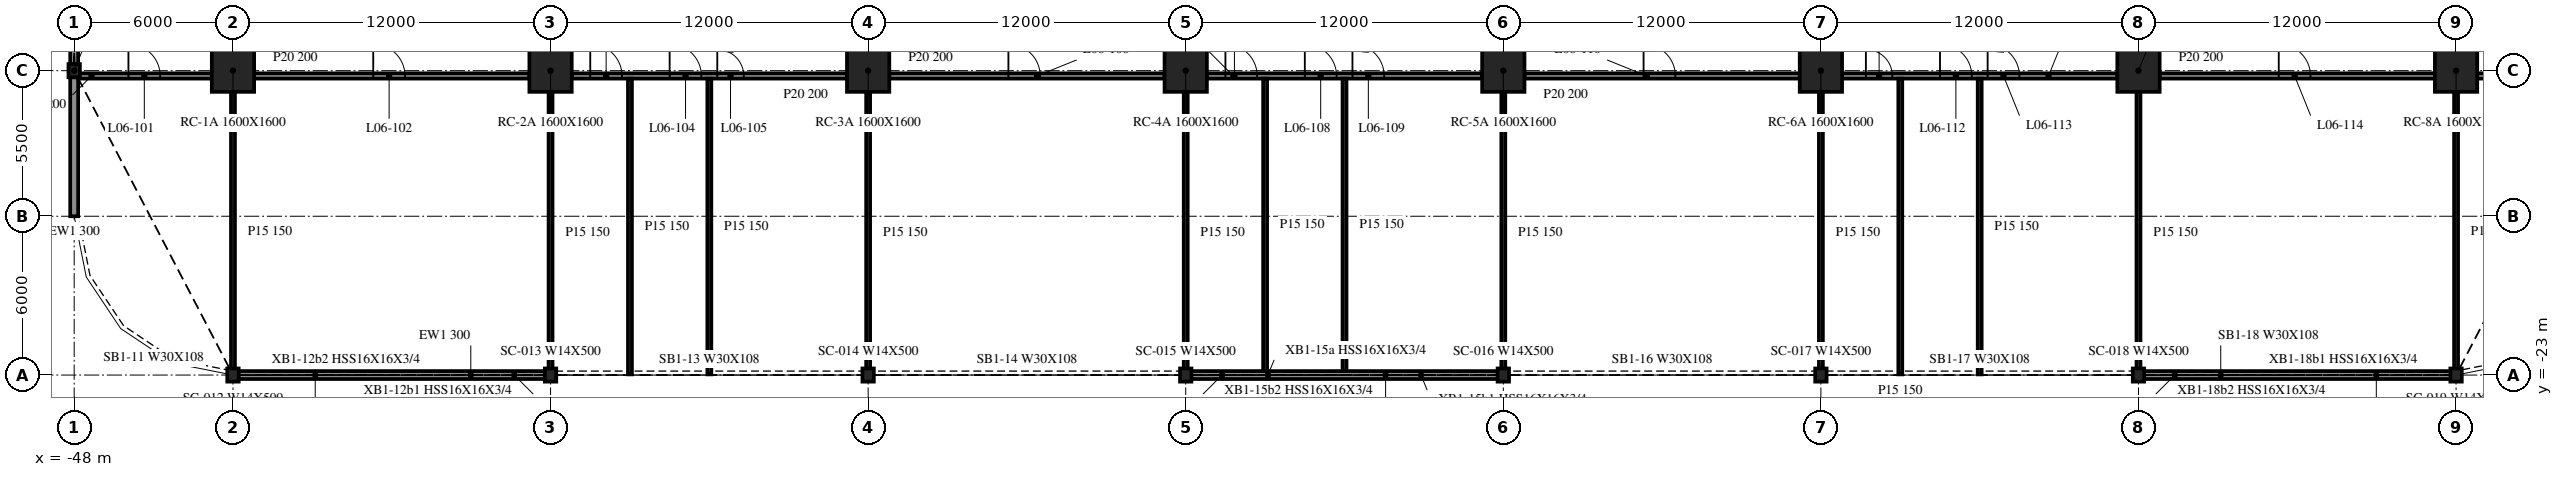
"""IFC4 building model, lengths in metres.
Left out: names, types, materials, properties, quantities, classifications, styles, units other than length and angle.
Written with IfcOpenShell. Run it as: python <this file> out.ifc"""

import sys

from ifc_helpers import new_model, si_unit, direction, frame, frame_2d, origin, origin_2d, place, context, subcontext, project, spatial, rectangle, i_section, extrude, element, fill, save


model = new_model("IFC4")
c1 = context("Model", 3, precision=1e-05, world=origin(), true_north=direction((0.0, 1.0)))
c2 = subcontext(c1, "Body", "Model", "MODEL_VIEW")
j1 = project(units=[si_unit("LENGTHUNIT", "METRE"), si_unit("PLANEANGLEUNIT", "RADIAN")], contexts=[c1])
p1 = place(None, origin())
s1 = spatial("IfcSite", under=j1, at=p1, CompositionType="ELEMENT")
p2 = place(p1, origin())
s2 = spatial("IfcBuilding", under=s1, at=p2, CompositionType="ELEMENT")
p3 = place(p2, frame((0.0, 0.0, 28.7)))
s3 = spatial("IfcBuildingStorey", under=s2, at=p3, CompositionType="ELEMENT", Elevation=28.7)
for number, where, z_axis, x_axis in (
    (1, (-42.0, -11.5, -0.34), (0.0, 0.0, 1.0), (1.0, 0.0, 0.0)),
    (2, (-30.0, -11.5, -0.34), (0.0, 0.0, 1.0), (1.0, 0.0, 0.0)),
    (3, (-18.0, -11.5, -0.34), (0.0, 0.0, 1.0), (1.0, 0.0, 0.0)),
    (4, (-6.0, -11.5, -0.34), (0.0, 0.0, 1.0), (1.0, 0.0, 0.0)),
    (5, (6.0, -11.5, -0.34), (0.0, 0.0, 1.0), (1.0, 0.0, 0.0)),
    (6, (18.0, -11.5, -0.34), (0.0, 0.0, 1.0), (1.0, 0.0, 0.0)),
    (7, (30.0, -11.5, -0.34), (0.0, 0.0, 1.0), (1.0, 0.0, 0.0)),
    (8, (42.0, -11.5, -0.34), (0.0, 0.0, 1.0), (1.0, 0.0, 0.0)),
):
    element("IfcColumn", number, at=place(p3, frame(where, z_axis=z_axis, x_axis=x_axis)), inside=s3, PredefinedType="COLUMN", context=c2, shape_type="SweptSolid", body=[
        extrude(rectangle(XDim=1.6, YDim=1.6, at=origin_2d()), origin(), (0.0, 0.0, 1.0), 4.3),
    ])
for number, where, z_axis, x_axis in (
    (9, (-48.0, -11.5, -0.34), (0.0, 0.0, 1.0), (1.0, 0.0, 0.0)),
    (10, (-42.0, -23.0, -0.34), (0.0, 0.0, 1.0), (1.0, 0.0, 0.0)),
    (11, (-30.0, -23.0, -0.34), (0.0, 0.0, 1.0), (1.0, 0.0, 0.0)),
    (12, (-18.0, -23.0, -0.34), (0.0, 0.0, 1.0), (1.0, 0.0, 0.0)),
    (13, (-6.0, -23.0, -0.34), (0.0, 0.0, 1.0), (1.0, 0.0, 0.0)),
    (14, (6.0, -23.0, -0.34), (0.0, 0.0, 1.0), (1.0, 0.0, 0.0)),
    (15, (18.0, -23.0, -0.34), (0.0, 0.0, 1.0), (1.0, 0.0, 0.0)),
    (16, (30.0, -23.0, -0.34), (0.0, 0.0, 1.0), (1.0, 0.0, 0.0)),
    (17, (42.0, -23.0, -0.34), (0.0, 0.0, 1.0), (1.0, 0.0, 0.0)),
):
    element("IfcColumn", number, at=place(p3, frame(where, z_axis=z_axis, x_axis=x_axis)), inside=s3, PredefinedType="COLUMN", context=c2, shape_type="SweptSolid", body=[
        extrude(i_section(OverallWidth=0.432, OverallDepth=0.498, WebThickness=0.056, FlangeThickness=0.089, at=origin_2d()), origin(), (0.0, 0.0, 1.0), 4.3),
    ])
p4 = place(p3, frame((-48.0, -0.249, 0.0), z_axis=(0.0, 0.0, 1.0), x_axis=(0.0, -1.0, 0.0)))
e18 = element("IfcWall", 18, at=p4, inside=s3, PredefinedType="NOTDEFINED", context=c2, shape_type="SweptSolid", body=[
    extrude(rectangle(XDim=11.002, YDim=0.3, at=frame_2d((5.501, 0.0))), origin(), (0.0, 0.0, 1.0), 3.203),
])
p5 = place(p3, frame((-48.0, -11.749, 0.0), z_axis=(0.0, 0.0, 1.0), x_axis=(0.0, -1.0, 0.0)))
e19 = element("IfcWall", 19, at=p5, inside=s3, PredefinedType="NOTDEFINED", context=c2, shape_type="SweptSolid", body=[
    extrude(rectangle(XDim=5.251, YDim=0.3, at=frame_2d((2.625, 0.0))), origin(), (0.0, 0.0, 1.0), 3.203),
])
for number, where, z_axis, x_axis in (
    (20, (-41.972, -23.0, 0.0), (0.0, 0.0, 1.0), (1.0, 0.0, 0.0)),
    (21, (-5.972, -23.0, 0.0), (0.0, 0.0, 1.0), (1.0, 0.0, 0.0)),
    (22, (30.028, -23.0, 0.0), (0.0, 0.0, 1.0), (1.0, 0.0, 0.0)),
):
    element("IfcWall", number, at=place(p3, frame(where, z_axis=z_axis, x_axis=x_axis)), inside=s3, PredefinedType="NOTDEFINED", context=c2, shape_type="SweptSolid", body=[
        extrude(rectangle(XDim=11.944, YDim=0.3, at=frame_2d((5.972, 0.0))), origin(), (0.0, 0.0, 1.0), 3.203),
    ])
p6 = place(p3, frame((-47.85, -11.7, 0.0), z_axis=(0.0, 0.0, 1.0), x_axis=(1.0, 0.0, 0.0)))
e23 = element("IfcWall", 23, at=p6, inside=s3, PredefinedType="PARTITIONING", context=c2, shape_type="SweptSolid", body=[
    extrude(rectangle(XDim=5.05, YDim=0.2, at=frame_2d((2.525, 0.0))), origin(), (0.0, 0.0, 1.0), 3.96),
])
p7 = place(p6, frame((1.9, 0.0, 0.0)))
e24 = element("IfcOpeningElement", 24, at=p7, cuts=e23, PredefinedType="OPENING", context=c2, shape_type="SweptSolid", body=[
    extrude(rectangle(XDim=1.2, YDim=2.1, at=frame_2d((0.6, 1.05))), frame((0.0, 0.11, 0.0), z_axis=(0.0, -1.0, 0.0), x_axis=(1.0, 0.0, 0.0)), (0.0, 0.0, 1.0), 0.22),
])
p8 = place(p3, frame((-41.2, -11.7, 0.0), z_axis=(0.0, 0.0, 1.0), x_axis=(1.0, 0.0, 0.0)))
e25 = element("IfcWall", 25, at=p8, inside=s3, PredefinedType="PARTITIONING", context=c2, shape_type="SweptSolid", body=[
    extrude(rectangle(XDim=10.4, YDim=0.2, at=frame_2d((5.2, 0.0))), origin(), (0.0, 0.0, 1.0), 3.96),
])
p9 = place(p8, frame((4.5, 0.0, 0.0)))
e26 = element("IfcOpeningElement", 26, at=p9, cuts=e25, PredefinedType="OPENING", context=c2, shape_type="SweptSolid", body=[
    extrude(rectangle(XDim=1.2, YDim=2.1, at=frame_2d((0.6, 1.05))), frame((0.0, 0.11, 0.0), z_axis=(0.0, -1.0, 0.0), x_axis=(1.0, 0.0, 0.0)), (0.0, 0.0, 1.0), 0.22),
])
p10 = place(p3, frame((-29.2, -11.7, 0.0), z_axis=(0.0, 0.0, 1.0), x_axis=(1.0, 0.0, 0.0)))
e27 = element("IfcWall", 27, at=p10, inside=s3, PredefinedType="PARTITIONING", context=c2, shape_type="SweptSolid", body=[
    extrude(rectangle(XDim=10.4, YDim=0.2, at=frame_2d((5.2, 0.0))), origin(), (0.0, 0.0, 1.0), 3.96),
])
p11 = place(p10, frame((0.7, 0.0, 0.0)))
e28 = element("IfcOpeningElement", 28, at=p11, cuts=e27, PredefinedType="OPENING", context=c2, shape_type="SweptSolid", body=[
    extrude(rectangle(XDim=1.2, YDim=2.1, at=frame_2d((0.6, 1.05))), frame((0.0, 0.11, 0.0), z_axis=(0.0, -1.0, 0.0), x_axis=(1.0, 0.0, 0.0)), (0.0, 0.0, 1.0), 0.22),
])
p12 = place(p10, frame((3.7, 0.0, 0.0)))
e29 = element("IfcOpeningElement", 29, at=p12, cuts=e27, PredefinedType="OPENING", context=c2, shape_type="SweptSolid", body=[
    extrude(rectangle(XDim=1.2, YDim=2.1, at=frame_2d((0.6, 1.05))), frame((0.0, 0.11, 0.0), z_axis=(0.0, -1.0, 0.0), x_axis=(1.0, 0.0, 0.0)), (0.0, 0.0, 1.0), 0.22),
])
p13 = place(p10, frame((5.5, 0.0, 0.0)))
e30 = element("IfcOpeningElement", 30, at=p13, cuts=e27, PredefinedType="OPENING", context=c2, shape_type="SweptSolid", body=[
    extrude(rectangle(XDim=1.0, YDim=2.1, at=frame_2d((0.5, 1.05))), frame((0.0, 0.11, 0.0), z_axis=(0.0, -1.0, 0.0), x_axis=(1.0, 0.0, 0.0)), (0.0, 0.0, 1.0), 0.22),
])
p14 = place(p3, frame((-17.2, -11.7, 0.0), z_axis=(0.0, 0.0, 1.0), x_axis=(1.0, 0.0, 0.0)))
e31 = element("IfcWall", 31, at=p14, inside=s3, PredefinedType="PARTITIONING", context=c2, shape_type="SweptSolid", body=[
    extrude(rectangle(XDim=10.4, YDim=0.2, at=frame_2d((5.2, 0.0))), origin(), (0.0, 0.0, 1.0), 3.96),
])
p15 = place(p14, frame((4.5, 0.0, 0.0)))
e32 = element("IfcOpeningElement", 32, at=p15, cuts=e31, PredefinedType="OPENING", context=c2, shape_type="SweptSolid", body=[
    extrude(rectangle(XDim=1.2, YDim=2.1, at=frame_2d((0.6, 1.05))), frame((0.0, 0.11, 0.0), z_axis=(0.0, -1.0, 0.0), x_axis=(1.0, 0.0, 0.0)), (0.0, 0.0, 1.0), 0.22),
])
p16 = place(p3, frame((-5.2, -11.7, 0.0), z_axis=(0.0, 0.0, 1.0), x_axis=(1.0, 0.0, 0.0)))
e33 = element("IfcWall", 33, at=p16, inside=s3, PredefinedType="PARTITIONING", context=c2, shape_type="SweptSolid", body=[
    extrude(rectangle(XDim=10.4, YDim=0.2, at=frame_2d((5.2, 0.0))), origin(), (0.0, 0.0, 1.0), 3.96),
])
p17 = place(p16, frame((0.7, 0.0, 0.0)))
e34 = element("IfcOpeningElement", 34, at=p17, cuts=e33, PredefinedType="OPENING", context=c2, shape_type="SweptSolid", body=[
    extrude(rectangle(XDim=1.2, YDim=2.1, at=frame_2d((0.6, 1.05))), frame((0.0, 0.11, 0.0), z_axis=(0.0, -1.0, 0.0), x_axis=(1.0, 0.0, 0.0)), (0.0, 0.0, 1.0), 0.22),
])
p18 = place(p16, frame((3.7, 0.0, 0.0)))
e35 = element("IfcOpeningElement", 35, at=p18, cuts=e33, PredefinedType="OPENING", context=c2, shape_type="SweptSolid", body=[
    extrude(rectangle(XDim=1.2, YDim=2.1, at=frame_2d((0.6, 1.05))), frame((0.0, 0.11, 0.0), z_axis=(0.0, -1.0, 0.0), x_axis=(1.0, 0.0, 0.0)), (0.0, 0.0, 1.0), 0.22),
])
p19 = place(p16, frame((5.5, 0.0, 0.0)))
e36 = element("IfcOpeningElement", 36, at=p19, cuts=e33, PredefinedType="OPENING", context=c2, shape_type="SweptSolid", body=[
    extrude(rectangle(XDim=1.2, YDim=2.1, at=frame_2d((0.6, 1.05))), frame((0.0, 0.11, 0.0), z_axis=(0.0, -1.0, 0.0), x_axis=(1.0, 0.0, 0.0)), (0.0, 0.0, 1.0), 0.22),
])
p20 = place(p3, frame((6.8, -11.7, 0.0), z_axis=(0.0, 0.0, 1.0), x_axis=(1.0, 0.0, 0.0)))
e37 = element("IfcWall", 37, at=p20, inside=s3, PredefinedType="PARTITIONING", context=c2, shape_type="SweptSolid", body=[
    extrude(rectangle(XDim=10.4, YDim=0.2, at=frame_2d((5.2, 0.0))), origin(), (0.0, 0.0, 1.0), 3.96),
])
p21 = place(p20, frame((4.5, 0.0, 0.0)))
e38 = element("IfcOpeningElement", 38, at=p21, cuts=e37, PredefinedType="OPENING", context=c2, shape_type="SweptSolid", body=[
    extrude(rectangle(XDim=1.2, YDim=2.1, at=frame_2d((0.6, 1.05))), frame((0.0, 0.11, 0.0), z_axis=(0.0, -1.0, 0.0), x_axis=(1.0, 0.0, 0.0)), (0.0, 0.0, 1.0), 0.22),
])
p22 = place(p3, frame((18.8, -11.7, 0.0), z_axis=(0.0, 0.0, 1.0), x_axis=(1.0, 0.0, 0.0)))
e39 = element("IfcWall", 39, at=p22, inside=s3, PredefinedType="PARTITIONING", context=c2, shape_type="SweptSolid", body=[
    extrude(rectangle(XDim=10.4, YDim=0.2, at=frame_2d((5.2, 0.0))), origin(), (0.0, 0.0, 1.0), 3.96),
])
p23 = place(p22, frame((0.9, 0.0, 0.0)))
e40 = element("IfcOpeningElement", 40, at=p23, cuts=e39, PredefinedType="OPENING", context=c2, shape_type="SweptSolid", body=[
    extrude(rectangle(XDim=1.0, YDim=2.1, at=frame_2d((0.5, 1.05))), frame((0.0, 0.11, 0.0), z_axis=(0.0, -1.0, 0.0), x_axis=(1.0, 0.0, 0.0)), (0.0, 0.0, 1.0), 0.22),
])
p24 = place(p22, frame((3.7, 0.0, 0.0)))
e41 = element("IfcOpeningElement", 41, at=p24, cuts=e39, PredefinedType="OPENING", context=c2, shape_type="SweptSolid", body=[
    extrude(rectangle(XDim=1.2, YDim=2.1, at=frame_2d((0.6, 1.05))), frame((0.0, 0.11, 0.0), z_axis=(0.0, -1.0, 0.0), x_axis=(1.0, 0.0, 0.0)), (0.0, 0.0, 1.0), 0.22),
])
p25 = place(p22, frame((5.5, 0.0, 0.0)))
e42 = element("IfcOpeningElement", 42, at=p25, cuts=e39, PredefinedType="OPENING", context=c2, shape_type="SweptSolid", body=[
    extrude(rectangle(XDim=1.2, YDim=2.1, at=frame_2d((0.6, 1.05))), frame((0.0, 0.11, 0.0), z_axis=(0.0, -1.0, 0.0), x_axis=(1.0, 0.0, 0.0)), (0.0, 0.0, 1.0), 0.22),
])
p26 = place(p3, frame((30.8, -11.7, 0.0), z_axis=(0.0, 0.0, 1.0), x_axis=(1.0, 0.0, 0.0)))
e43 = element("IfcWall", 43, at=p26, inside=s3, PredefinedType="PARTITIONING", context=c2, shape_type="SweptSolid", body=[
    extrude(rectangle(XDim=10.4, YDim=0.2, at=frame_2d((5.2, 0.0))), origin(), (0.0, 0.0, 1.0), 3.96),
])
p27 = place(p26, frame((4.5, 0.0, 0.0)))
e44 = element("IfcOpeningElement", 44, at=p27, cuts=e43, PredefinedType="OPENING", context=c2, shape_type="SweptSolid", body=[
    extrude(rectangle(XDim=1.2, YDim=2.1, at=frame_2d((0.6, 1.05))), frame((0.0, 0.11, 0.0), z_axis=(0.0, -1.0, 0.0), x_axis=(1.0, 0.0, 0.0)), (0.0, 0.0, 1.0), 0.22),
])
p28 = place(p3, frame((42.8, -11.7, 0.0), z_axis=(0.0, 0.0, 1.0), x_axis=(1.0, 0.0, 0.0)))
e45 = element("IfcWall", 45, at=p28, inside=s3, PredefinedType="PARTITIONING", context=c2, shape_type="SweptSolid", body=[
    extrude(rectangle(XDim=5.05, YDim=0.2, at=frame_2d((2.525, 0.0))), origin(), (0.0, 0.0, 1.0), 3.96),
])
p29 = place(p28, frame((1.9, 0.0, 0.0)))
e46 = element("IfcOpeningElement", 46, at=p29, cuts=e45, PredefinedType="OPENING", context=c2, shape_type="SweptSolid", body=[
    extrude(rectangle(XDim=1.2, YDim=2.1, at=frame_2d((0.6, 1.05))), frame((0.0, 0.11, 0.0), z_axis=(0.0, -1.0, 0.0), x_axis=(1.0, 0.0, 0.0)), (0.0, 0.0, 1.0), 0.22),
])
p30 = place(p3, frame((-42.0, -22.847, 0.0), z_axis=(0.0, 0.0, 1.0), x_axis=(0.0, 1.0, 0.0)))
e47 = element("IfcWall", 47, at=p30, inside=s3, PredefinedType="PARTITIONING", context=c2, shape_type="SweptSolid", body=[
    extrude(rectangle(XDim=10.547, YDim=0.15, at=frame_2d((5.273, 0.0))), origin(), (0.0, 0.0, 1.0), 3.96),
])
p31 = place(p3, frame((-30.0, -22.975, 0.0), z_axis=(0.0, 0.0, 1.0), x_axis=(0.0, 1.0, 0.0)))
e48 = element("IfcWall", 48, at=p31, inside=s3, PredefinedType="PARTITIONING", context=c2, shape_type="SweptSolid", body=[
    extrude(rectangle(XDim=10.675, YDim=0.15, at=frame_2d((5.337, 0.0))), origin(), (0.0, 0.0, 1.0), 3.96),
])
for number, where, z_axis, x_axis in (
    (49, (-27.0, -22.975, 0.0), (0.0, 0.0, 1.0), (0.0, 1.0, 0.0)),
    (50, (-24.0, -22.975, 0.0), (0.0, 0.0, 1.0), (0.0, 1.0, 0.0)),
):
    element("IfcWall", number, at=place(p3, frame(where, z_axis=z_axis, x_axis=x_axis)), inside=s3, PredefinedType="PARTITIONING", context=c2, shape_type="SweptSolid", body=[
        extrude(rectangle(XDim=11.175, YDim=0.15, at=frame_2d((5.587, 0.0))), origin(), (0.0, 0.0, 1.0), 3.96),
    ])
for number, where, z_axis, x_axis in (
    (51, (-18.0, -22.975, 0.0), (0.0, 0.0, 1.0), (0.0, 1.0, 0.0)),
    (52, (-6.0, -22.975, 0.0), (0.0, 0.0, 1.0), (0.0, 1.0, 0.0)),
):
    element("IfcWall", number, at=place(p3, frame(where, z_axis=z_axis, x_axis=x_axis)), inside=s3, PredefinedType="PARTITIONING", context=c2, shape_type="SweptSolid", body=[
        extrude(rectangle(XDim=10.675, YDim=0.15, at=frame_2d((5.337, 0.0))), origin(), (0.0, 0.0, 1.0), 3.96),
    ])
for number, where, z_axis, x_axis in (
    (53, (-3.0, -22.85, 0.0), (0.0, 0.0, 1.0), (0.0, 1.0, 0.0)),
    (54, (0.0, -22.85, 0.0), (0.0, 0.0, 1.0), (0.0, 1.0, 0.0)),
):
    element("IfcWall", number, at=place(p3, frame(where, z_axis=z_axis, x_axis=x_axis)), inside=s3, PredefinedType="PARTITIONING", context=c2, shape_type="SweptSolid", body=[
        extrude(rectangle(XDim=11.05, YDim=0.15, at=frame_2d((5.525, 0.0))), origin(), (0.0, 0.0, 1.0), 3.96),
    ])
for number, where, z_axis, x_axis in (
    (55, (6.0, -22.975, 0.0), (0.0, 0.0, 1.0), (0.0, 1.0, 0.0)),
    (56, (18.0, -22.975, 0.0), (0.0, 0.0, 1.0), (0.0, 1.0, 0.0)),
):
    element("IfcWall", number, at=place(p3, frame(where, z_axis=z_axis, x_axis=x_axis)), inside=s3, PredefinedType="PARTITIONING", context=c2, shape_type="SweptSolid", body=[
        extrude(rectangle(XDim=10.675, YDim=0.15, at=frame_2d((5.337, 0.0))), origin(), (0.0, 0.0, 1.0), 3.96),
    ])
for number, where, z_axis, x_axis in (
    (57, (21.0, -22.975, 0.0), (0.0, 0.0, 1.0), (0.0, 1.0, 0.0)),
    (58, (24.0, -22.975, 0.0), (0.0, 0.0, 1.0), (0.0, 1.0, 0.0)),
):
    element("IfcWall", number, at=place(p3, frame(where, z_axis=z_axis, x_axis=x_axis)), inside=s3, PredefinedType="PARTITIONING", context=c2, shape_type="SweptSolid", body=[
        extrude(rectangle(XDim=11.175, YDim=0.15, at=frame_2d((5.587, 0.0))), origin(), (0.0, 0.0, 1.0), 3.96),
    ])
p32 = place(p3, frame((30.0, -22.975, 0.0), z_axis=(0.0, 0.0, 1.0), x_axis=(0.0, 1.0, 0.0)))
e59 = element("IfcWall", 59, at=p32, inside=s3, PredefinedType="PARTITIONING", context=c2, shape_type="SweptSolid", body=[
    extrude(rectangle(XDim=10.675, YDim=0.15, at=frame_2d((5.337, 0.0))), origin(), (0.0, 0.0, 1.0), 3.96),
])
p33 = place(p3, frame((42.0, -22.847, 0.0), z_axis=(0.0, 0.0, 1.0), x_axis=(0.0, 1.0, 0.0)))
e60 = element("IfcWall", 60, at=p33, inside=s3, PredefinedType="PARTITIONING", context=c2, shape_type="SweptSolid", body=[
    extrude(rectangle(XDim=10.547, YDim=0.15, at=frame_2d((5.273, 0.0))), origin(), (0.0, 0.0, 1.0), 3.96),
])
p34 = place(p7, origin())
e61 = element("IfcDoor", 61, at=p34, inside=s3, OperationType="SINGLE_SWING_RIGHT", PredefinedType="DOOR", context=c2, shape_type="SweptSolid", body=[
    extrude(rectangle(XDim=1.2, YDim=2.1, at=frame_2d((0.6, 1.05))), frame((0.0, 0.025, 0.0), z_axis=(0.0, -1.0, 0.0), x_axis=(1.0, 0.0, 0.0)), (0.0, 0.0, 1.0), 0.05),
])
fill(e24, e61)
p35 = place(p9, origin())
e62 = element("IfcDoor", 62, at=p35, inside=s3, OperationType="SINGLE_SWING_RIGHT", PredefinedType="DOOR", context=c2, shape_type="SweptSolid", body=[
    extrude(rectangle(XDim=1.2, YDim=2.1, at=frame_2d((0.6, 1.05))), frame((0.0, 0.025, 0.0), z_axis=(0.0, -1.0, 0.0), x_axis=(1.0, 0.0, 0.0)), (0.0, 0.0, 1.0), 0.05),
])
fill(e26, e62)
p36 = place(p11, origin())
e63 = element("IfcDoor", 63, at=p36, inside=s3, OperationType="SINGLE_SWING_RIGHT", PredefinedType="DOOR", context=c2, shape_type="SweptSolid", body=[
    extrude(rectangle(XDim=1.2, YDim=2.1, at=frame_2d((0.6, 1.05))), frame((0.0, 0.025, 0.0), z_axis=(0.0, -1.0, 0.0), x_axis=(1.0, 0.0, 0.0)), (0.0, 0.0, 1.0), 0.05),
])
fill(e28, e63)
p37 = place(p12, origin())
e64 = element("IfcDoor", 64, at=p37, inside=s3, OperationType="SINGLE_SWING_RIGHT", PredefinedType="DOOR", context=c2, shape_type="SweptSolid", body=[
    extrude(rectangle(XDim=1.2, YDim=2.1, at=frame_2d((0.6, 1.05))), frame((0.0, 0.025, 0.0), z_axis=(0.0, -1.0, 0.0), x_axis=(1.0, 0.0, 0.0)), (0.0, 0.0, 1.0), 0.05),
])
fill(e29, e64)
p38 = place(p13, origin())
e65 = element("IfcDoor", 65, at=p38, inside=s3, OperationType="SINGLE_SWING_LEFT", PredefinedType="DOOR", context=c2, shape_type="SweptSolid", body=[
    extrude(rectangle(XDim=1.0, YDim=2.1, at=frame_2d((0.5, 1.05))), frame((0.0, 0.025, 0.0), z_axis=(0.0, -1.0, 0.0), x_axis=(1.0, 0.0, 0.0)), (0.0, 0.0, 1.0), 0.05),
])
fill(e30, e65)
p39 = place(p15, origin())
e66 = element("IfcDoor", 66, at=p39, inside=s3, OperationType="SINGLE_SWING_RIGHT", PredefinedType="DOOR", context=c2, shape_type="SweptSolid", body=[
    extrude(rectangle(XDim=1.2, YDim=2.1, at=frame_2d((0.6, 1.05))), frame((0.0, 0.025, 0.0), z_axis=(0.0, -1.0, 0.0), x_axis=(1.0, 0.0, 0.0)), (0.0, 0.0, 1.0), 0.05),
])
fill(e32, e66)
p40 = place(p17, origin())
e67 = element("IfcDoor", 67, at=p40, inside=s3, OperationType="SINGLE_SWING_RIGHT", PredefinedType="DOOR", context=c2, shape_type="SweptSolid", body=[
    extrude(rectangle(XDim=1.2, YDim=2.1, at=frame_2d((0.6, 1.05))), frame((0.0, 0.025, 0.0), z_axis=(0.0, -1.0, 0.0), x_axis=(1.0, 0.0, 0.0)), (0.0, 0.0, 1.0), 0.05),
])
fill(e34, e67)
p41 = place(p18, origin())
e68 = element("IfcDoor", 68, at=p41, inside=s3, OperationType="SINGLE_SWING_RIGHT", PredefinedType="DOOR", context=c2, shape_type="SweptSolid", body=[
    extrude(rectangle(XDim=1.2, YDim=2.1, at=frame_2d((0.6, 1.05))), frame((0.0, 0.025, 0.0), z_axis=(0.0, -1.0, 0.0), x_axis=(1.0, 0.0, 0.0)), (0.0, 0.0, 1.0), 0.05),
])
fill(e35, e68)
p42 = place(p19, origin())
e69 = element("IfcDoor", 69, at=p42, inside=s3, OperationType="SINGLE_SWING_LEFT", PredefinedType="DOOR", context=c2, shape_type="SweptSolid", body=[
    extrude(rectangle(XDim=1.2, YDim=2.1, at=frame_2d((0.6, 1.05))), frame((0.0, 0.025, 0.0), z_axis=(0.0, -1.0, 0.0), x_axis=(1.0, 0.0, 0.0)), (0.0, 0.0, 1.0), 0.05),
])
fill(e36, e69)
p43 = place(p21, origin())
e70 = element("IfcDoor", 70, at=p43, inside=s3, OperationType="SINGLE_SWING_RIGHT", PredefinedType="DOOR", context=c2, shape_type="SweptSolid", body=[
    extrude(rectangle(XDim=1.2, YDim=2.1, at=frame_2d((0.6, 1.05))), frame((0.0, 0.025, 0.0), z_axis=(0.0, -1.0, 0.0), x_axis=(1.0, 0.0, 0.0)), (0.0, 0.0, 1.0), 0.05),
])
fill(e38, e70)
p44 = place(p23, origin())
e71 = element("IfcDoor", 71, at=p44, inside=s3, OperationType="SINGLE_SWING_RIGHT", PredefinedType="DOOR", context=c2, shape_type="SweptSolid", body=[
    extrude(rectangle(XDim=1.0, YDim=2.1, at=frame_2d((0.5, 1.05))), frame((0.0, 0.025, 0.0), z_axis=(0.0, -1.0, 0.0), x_axis=(1.0, 0.0, 0.0)), (0.0, 0.0, 1.0), 0.05),
])
fill(e40, e71)
p45 = place(p24, origin())
e72 = element("IfcDoor", 72, at=p45, inside=s3, OperationType="SINGLE_SWING_RIGHT", PredefinedType="DOOR", context=c2, shape_type="SweptSolid", body=[
    extrude(rectangle(XDim=1.2, YDim=2.1, at=frame_2d((0.6, 1.05))), frame((0.0, 0.025, 0.0), z_axis=(0.0, -1.0, 0.0), x_axis=(1.0, 0.0, 0.0)), (0.0, 0.0, 1.0), 0.05),
])
fill(e41, e72)
p46 = place(p25, origin())
e73 = element("IfcDoor", 73, at=p46, inside=s3, OperationType="SINGLE_SWING_LEFT", PredefinedType="DOOR", context=c2, shape_type="SweptSolid", body=[
    extrude(rectangle(XDim=1.2, YDim=2.1, at=frame_2d((0.6, 1.05))), frame((0.0, 0.025, 0.0), z_axis=(0.0, -1.0, 0.0), x_axis=(1.0, 0.0, 0.0)), (0.0, 0.0, 1.0), 0.05),
])
fill(e42, e73)
p47 = place(p27, origin())
e74 = element("IfcDoor", 74, at=p47, inside=s3, OperationType="SINGLE_SWING_RIGHT", PredefinedType="DOOR", context=c2, shape_type="SweptSolid", body=[
    extrude(rectangle(XDim=1.2, YDim=2.1, at=frame_2d((0.6, 1.05))), frame((0.0, 0.025, 0.0), z_axis=(0.0, -1.0, 0.0), x_axis=(1.0, 0.0, 0.0)), (0.0, 0.0, 1.0), 0.05),
])
fill(e44, e74)
save(model, sys.argv[1])
